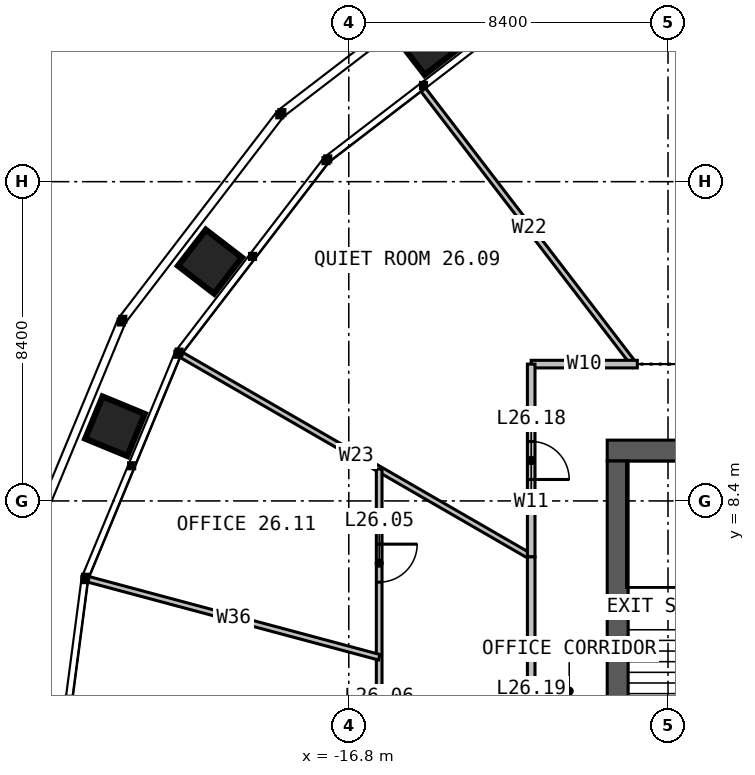
"""IFC4 building model, lengths in metres.
Left out: names, types, materials, properties, quantities, classifications, styles, units other than length and angle.
Written with IfcOpenShell. Run it as: python <this file> out.ifc"""

import sys

from ifc_helpers import new_model, si_unit, direction, frame, frame_2d, origin, place, context, subcontext, project, spatial, rectangle, extrude, element, fill, save


model = new_model("IFC4")
c1 = context("Model", 3, precision=1e-05, world=origin(), true_north=direction((0.0, 1.0)))
c2 = subcontext(c1, "Body", "Model", "MODEL_VIEW")
j1 = project(units=[si_unit("LENGTHUNIT", "METRE"), si_unit("PLANEANGLEUNIT", "RADIAN")], contexts=[c1])
p1 = place(None, origin())
s1 = spatial("IfcSite", under=j1, at=p1, CompositionType="ELEMENT")
p2 = place(p1, origin())
s2 = spatial("IfcBuilding", under=s1, at=p2, CompositionType="ELEMENT")
p3 = place(p2, frame((0.0, 0.0, 110.0)))
s3 = spatial("IfcBuildingStorey", under=s2, at=p3, CompositionType="ELEMENT", Elevation=110.0)
p4 = place(p3, frame((-10.0, 9.725, 0.0), z_axis=(0.0, 0.0, 1.0), x_axis=(1.0, 0.0, 0.0)))
e1 = element("IfcWall", 1, at=p4, inside=s3, PredefinedType="SOLIDWALL", context=c2, shape_type="SweptSolid", body=[
    extrude(rectangle(XDim=20.0, YDim=0.55, at=frame_2d((10.0, 0.0))), origin(), (0.0, 0.0, 1.0), 4.0),
])
p5 = place(p4, frame((9.4, 0.0, 0.0)))
e2 = element("IfcOpeningElement", 2, at=p5, cuts=e1, PredefinedType="OPENING", context=c2, shape_type="SweptSolid", body=[
    extrude(rectangle(XDim=1.2, YDim=2.2, at=frame_2d((0.6, 1.1))), frame((0.0, 0.285, 0.0), z_axis=(0.0, -1.0, 0.0), x_axis=(1.0, 0.0, 0.0)), (0.0, 0.0, 1.0), 0.57),
])
p6 = place(p3, frame((-9.725, 9.45, 0.0), z_axis=(0.0, 0.0, 1.0), x_axis=(0.0, -1.0, 0.0)))
e3 = element("IfcWall", 3, at=p6, inside=s3, PredefinedType="SOLIDWALL", context=c2, shape_type="SweptSolid", body=[
    extrude(rectangle(XDim=18.9, YDim=0.55, at=frame_2d((9.45, 0.0))), origin(), (0.0, 0.0, 1.0), 4.0),
])
p7 = place(p3, frame((-9.267, 11.954, 0.0), z_axis=(0.0, 0.0, 1.0), x_axis=(-0.60873054766, 0.793377035429, 0.0)))
e4 = element("IfcWall", 4, at=p7, inside=s3, PredefinedType="PARTITIONING", context=c2, shape_type="SweptSolid", body=[
    extrude(rectangle(XDim=9.152, YDim=0.15, at=frame_2d((4.576, 0.0))), origin(), (0.0, 0.0, 1.0), 2.79),
])
p8 = place(p3, frame((-12.0, 6.928, 0.0), z_axis=(0.0, 0.0, 1.0), x_axis=(-0.866024197053, 0.500002090115, 0.0)))
e5 = element("IfcWall", 5, at=p8, inside=s3, PredefinedType="PARTITIONING", context=c2, shape_type="SweptSolid", body=[
    extrude(rectangle(XDim=10.631, YDim=0.15, at=frame_2d((5.315, 0.0))), origin(), (0.0, 0.0, 1.0), 2.79),
])
p9 = place(p3, frame((-9.207, 12.0, 0.0), z_axis=(0.0, 0.0, 1.0), x_axis=(-1.0, 0.0, 0.0)))
e6 = element("IfcWall", 6, at=p9, inside=s3, PredefinedType="PARTITIONING", context=c2, shape_type="SweptSolid", body=[
    extrude(rectangle(XDim=2.793, YDim=0.2, at=frame_2d((1.396, 0.0))), origin(), (0.0, 0.0, 1.0), 3.8),
])
p10 = place(p3, frame((-12.0, 12.0, 0.0), z_axis=(0.0, 0.0, 1.0), x_axis=(0.0, -1.0, 0.0)))
e7 = element("IfcWall", 7, at=p10, inside=s3, PredefinedType="PARTITIONING", context=c2, shape_type="SweptSolid", body=[
    extrude(rectangle(XDim=5.072, YDim=0.2, at=frame_2d((2.536, 0.0))), origin(), (0.0, 0.0, 1.0), 3.8),
])
p11 = place(p10, frame((2.036, 0.0, 0.0)))
e8 = element("IfcOpeningElement", 8, at=p11, cuts=e7, PredefinedType="OPENING", context=c2, shape_type="SweptSolid", body=[
    extrude(rectangle(XDim=1.0, YDim=2.2, at=frame_2d((0.5, 1.1))), frame((0.0, 0.11, 0.0), z_axis=(0.0, -1.0, 0.0), x_axis=(1.0, 0.0, 0.0)), (0.0, 0.0, 1.0), 0.22),
])
p12 = place(p3, frame((-16.0, 9.238, 0.0), z_axis=(0.0, 0.0, 1.0), x_axis=(0.0, -1.0, 0.0)))
e9 = element("IfcWall", 9, at=p12, inside=s3, PredefinedType="PARTITIONING", context=c2, shape_type="SweptSolid", body=[
    extrude(rectangle(XDim=13.525, YDim=0.15, at=frame_2d((6.762, 0.0))), origin(), (0.0, 0.0, 1.0), 2.79),
])
p13 = place(p12, frame((1.975, 0.0, 0.0)))
e10 = element("IfcOpeningElement", 10, at=p13, cuts=e9, PredefinedType="OPENING", context=c2, shape_type="SweptSolid", body=[
    extrude(rectangle(XDim=1.0, YDim=2.2, at=frame_2d((0.5, 1.1))), frame((0.0, 0.085, 0.0), z_axis=(0.0, -1.0, 0.0), x_axis=(1.0, 0.0, 0.0)), (0.0, 0.0, 1.0), 0.17),
])
p14 = place(p12, frame((6.594, 0.0, 0.0)))
e11 = element("IfcOpeningElement", 11, at=p14, cuts=e9, PredefinedType="OPENING", context=c2, shape_type="SweptSolid", body=[
    extrude(rectangle(XDim=1.0, YDim=2.2, at=frame_2d((0.5, 1.1))), frame((0.0, 0.085, 0.0), z_axis=(0.0, -1.0, 0.0), x_axis=(1.0, 0.0, 0.0)), (0.0, 0.0, 1.0), 0.17),
])
p15 = place(p12, frame((10.881, 0.0, 0.0)))
e12 = element("IfcOpeningElement", 12, at=p15, cuts=e9, PredefinedType="OPENING", context=c2, shape_type="SweptSolid", body=[
    extrude(rectangle(XDim=1.0, YDim=2.2, at=frame_2d((0.5, 1.1))), frame((0.0, 0.085, 0.0), z_axis=(0.0, -1.0, 0.0), x_axis=(1.0, 0.0, 0.0)), (0.0, 0.0, 1.0), 0.17),
])
p16 = place(p3, frame((-16.0, 4.287, 0.0), z_axis=(0.0, 0.0, 1.0), x_axis=(-0.965926869261, 0.258815152648, 0.0)))
e13 = element("IfcWall", 13, at=p16, inside=s3, PredefinedType="PARTITIONING", context=c2, shape_type="SweptSolid", body=[
    extrude(rectangle(XDim=7.923, YDim=0.15, at=frame_2d((3.961, 0.0))), origin(), (0.0, 0.0, 1.0), 2.79),
])
p17 = place(p3, frame((-12.0, 6.928, 0.0), z_axis=(0.0, 0.0, 1.0), x_axis=(0.0, -1.0, 0.0)))
e14 = element("IfcWall", 14, at=p17, inside=s3, PredefinedType="PARTITIONING", context=c2, shape_type="SweptSolid", body=[
    extrude(rectangle(XDim=10.144, YDim=0.2, at=frame_2d((5.072, 0.0))), origin(), (0.0, 0.0, 1.0), 3.8),
])
p18 = place(p17, frame((4.172, 0.0, 0.0)))
e15 = element("IfcOpeningElement", 15, at=p18, cuts=e14, PredefinedType="OPENING", context=c2, shape_type="SweptSolid", body=[
    extrude(rectangle(XDim=1.8, YDim=2.2, at=frame_2d((0.9, 1.1))), frame((0.0, 0.11, 0.0), z_axis=(0.0, -1.0, 0.0), x_axis=(1.0, 0.0, 0.0)), (0.0, 0.0, 1.0), 0.22),
])
p19 = place(p11, origin())
e16 = element("IfcDoor", 16, at=p19, inside=s3, OperationType="SINGLE_SWING_RIGHT", PredefinedType="DOOR", context=c2, shape_type="SweptSolid", body=[
    extrude(rectangle(XDim=1.0, YDim=2.2, at=frame_2d((0.5, 1.1))), frame((0.0, 0.025, 0.0), z_axis=(0.0, -1.0, 0.0), x_axis=(1.0, 0.0, 0.0)), (0.0, 0.0, 1.0), 0.05),
])
fill(e8, e16)
p20 = place(p13, origin())
e17 = element("IfcDoor", 17, at=p20, inside=s3, OperationType="SINGLE_SWING_LEFT", PredefinedType="DOOR", context=c2, shape_type="SweptSolid", body=[
    extrude(rectangle(XDim=1.0, YDim=2.2, at=frame_2d((0.5, 1.1))), frame((0.0, 0.025, 0.0), z_axis=(0.0, -1.0, 0.0), x_axis=(1.0, 0.0, 0.0)), (0.0, 0.0, 1.0), 0.05),
])
fill(e10, e17)
save(model, sys.argv[1])
